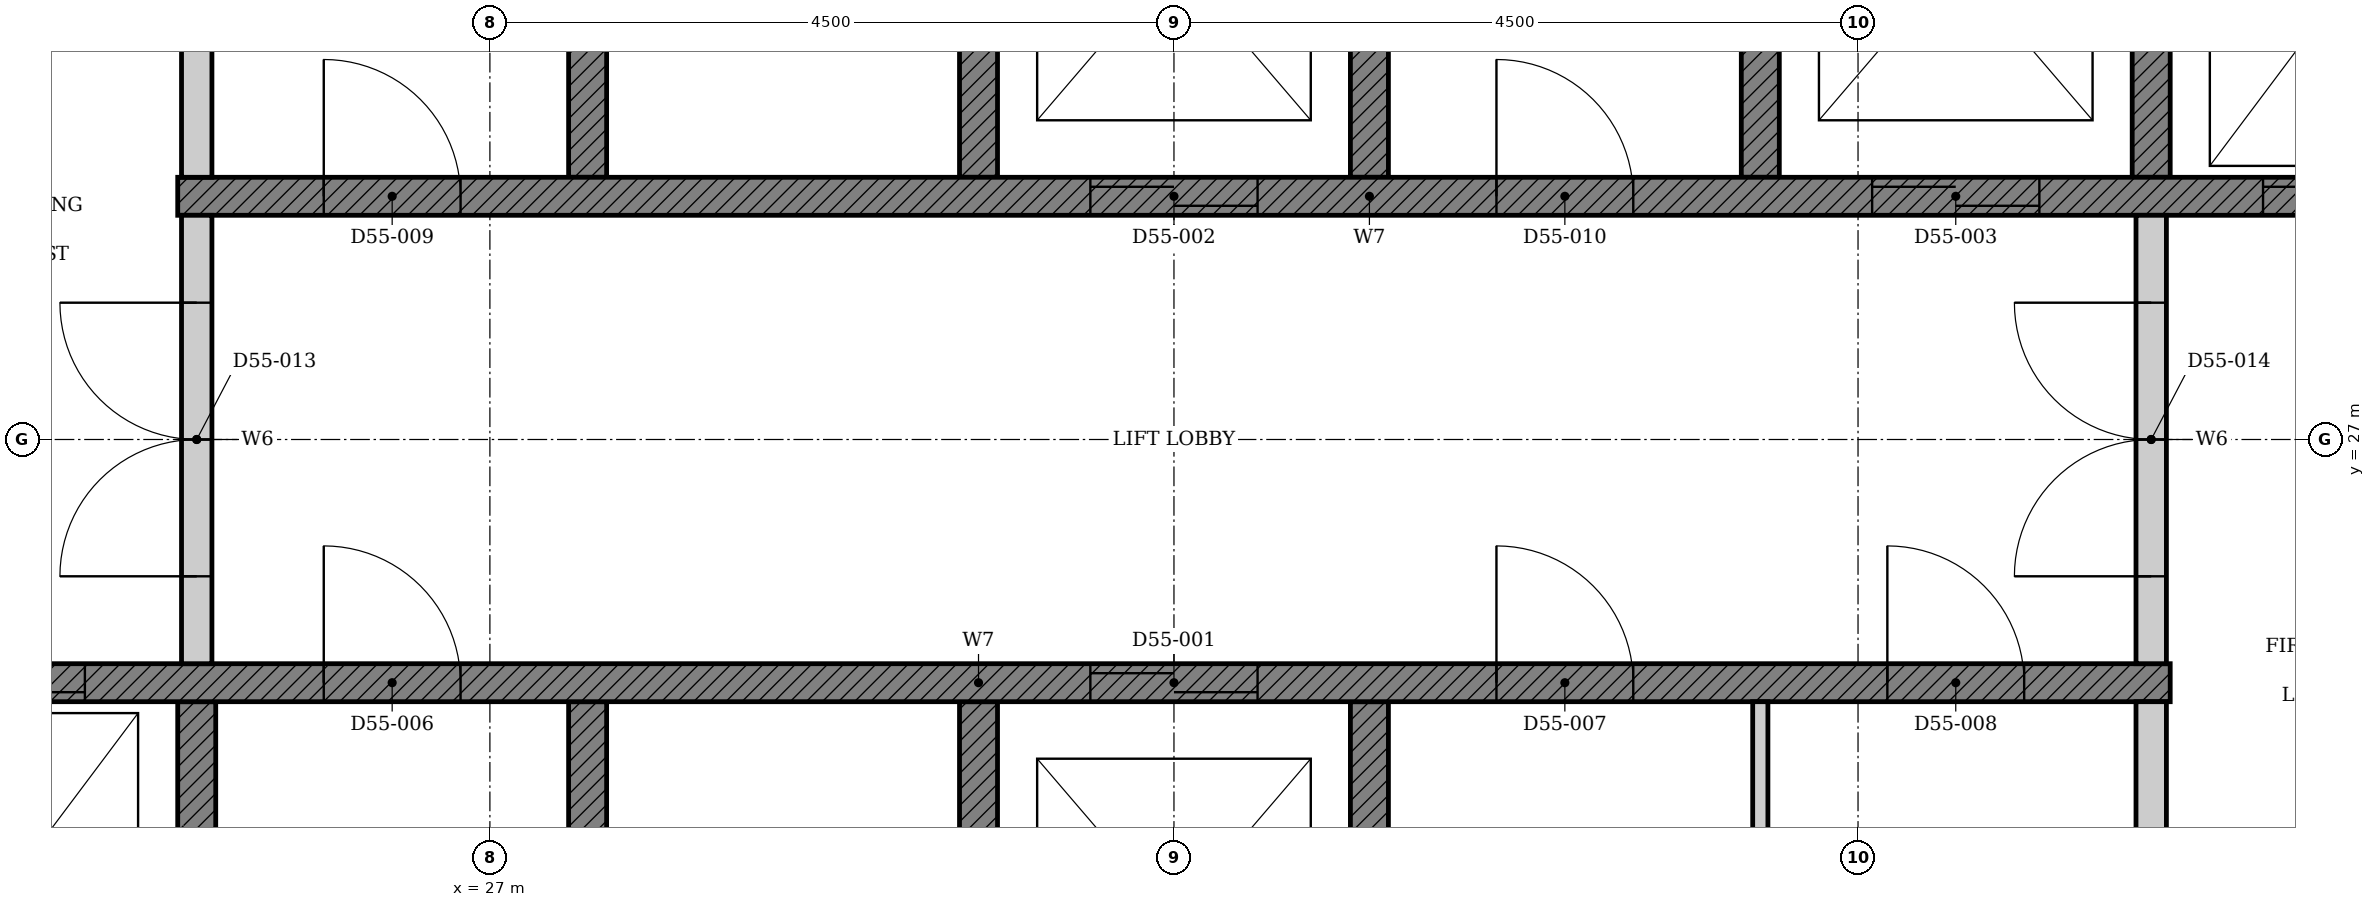
"""IFC4 building model, lengths in metres.
Left out: names, types, materials, properties, quantities, classifications, styles, units other than length and angle.
Written with IfcOpenShell. Run it as: python <this file> out.ifc"""

import sys

from ifc_helpers import new_model, si_unit, direction, frame, frame_2d, origin, place, context, subcontext, project, spatial, polyline, rectangle, outline, extrude, element, fill, save


model = new_model("IFC4")
c1 = context("Model", 3, precision=1e-05, world=origin(), true_north=direction((0.0, 1.0)))
c2 = subcontext(c1, "Body", "Model", "MODEL_VIEW")
j1 = project(units=[si_unit("LENGTHUNIT", "METRE"), si_unit("PLANEANGLEUNIT", "RADIAN")], contexts=[c1])
p1 = place(None, origin())
s1 = spatial("IfcSite", under=j1, at=p1, CompositionType="ELEMENT")
p2 = place(p1, origin())
s2 = spatial("IfcBuilding", under=s1, at=p2, CompositionType="ELEMENT")
p3 = place(p2, frame((0.0, 0.0, 218.3)))
s3 = spatial("IfcBuildingStorey", under=s2, at=p3, CompositionType="ELEMENT", Elevation=218.3)
p4 = place(p3, origin())
e1 = element("IfcWall", 1, at=p4, inside=s3, PredefinedType="SHEAR", context=c2, shape_type="SweptSolid", body=[
    extrude(outline(polyline([(22.375, 22.35), (25.197, 22.35), (25.197, 25.275), (24.947, 25.275), (24.947, 22.65), (22.625, 22.65), (22.625, 25.275), (22.375, 25.275), (22.375, 22.35)])), origin(), (0.0, 0.0, 1.0), 3.4),
])
p5 = place(p3, origin())
e2 = element("IfcWall", 2, at=p5, inside=s3, PredefinedType="SHEAR", context=c2, shape_type="SweptSolid", body=[
    extrude(outline(polyline([(27.518, 22.35), (32.911, 22.35), (32.911, 25.275), (32.661, 25.275), (32.661, 22.65), (30.339, 22.65), (30.339, 25.275), (30.089, 25.275), (30.089, 22.65), (27.768, 22.65), (27.768, 25.275), (27.518, 25.275), (27.518, 22.35)])), origin(), (0.0, 0.0, 1.0), 3.4),
])
p6 = place(p3, origin())
e3 = element("IfcWall", 3, at=p6, inside=s3, PredefinedType="SHEAR", context=c2, shape_type="SweptSolid", body=[
    extrude(outline(polyline([(27.518, 28.725), (27.768, 28.725), (27.768, 31.35), (30.089, 31.35), (30.089, 28.725), (30.339, 28.725), (30.339, 31.35), (32.661, 31.35), (32.661, 28.725), (32.911, 28.725), (32.911, 31.65), (27.518, 31.65), (27.518, 28.725)])), origin(), (0.0, 0.0, 1.0), 3.4),
])
p7 = place(p3, origin())
e4 = element("IfcWall", 4, at=p7, inside=s3, PredefinedType="SHEAR", context=c2, shape_type="SweptSolid", body=[
    extrude(outline(polyline([(35.232, 28.725), (35.482, 28.725), (35.482, 31.35), (37.803, 31.35), (37.803, 28.725), (38.053, 28.725), (38.053, 31.35), (40.375, 31.35), (40.375, 28.725), (40.625, 28.725), (40.625, 31.65), (35.232, 31.65), (35.232, 28.725)])), origin(), (0.0, 0.0, 1.0), 3.4),
])
p8 = place(p3, frame((22.375, 25.4, 0.0), z_axis=(0.0, 0.0, 1.0), x_axis=(1.0, 0.0, 0.0)))
e5 = element("IfcWall", 5, at=p8, inside=s3, PredefinedType="SHEAR", context=c2, shape_type="SweptSolid", body=[
    extrude(rectangle(XDim=15.678, YDim=0.25, at=frame_2d((7.839, 0.0))), origin(), (0.0, 0.0, 1.0), 3.4),
])
p9 = place(p8, frame((8.575, 0.0, 0.0)))
e6 = element("IfcOpeningElement", 6, at=p9, cuts=e5, PredefinedType="OPENING", context=c2, shape_type="SweptSolid", body=[
    extrude(rectangle(XDim=1.1, YDim=2.1, at=frame_2d((0.55, 1.05))), frame((0.0, 0.135, 0.0), z_axis=(0.0, -1.0, 0.0), x_axis=(1.0, 0.0, 0.0)), (0.0, 0.0, 1.0), 0.27),
])
p10 = place(p8, frame((0.861, 0.0, 0.0)))
e7 = element("IfcOpeningElement", 7, at=p10, cuts=e5, PredefinedType="OPENING", context=c2, shape_type="SweptSolid", body=[
    extrude(rectangle(XDim=1.1, YDim=2.1, at=frame_2d((0.55, 1.05))), frame((0.0, 0.135, 0.0), z_axis=(0.0, -1.0, 0.0), x_axis=(1.0, 0.0, 0.0)), (0.0, 0.0, 1.0), 0.27),
])
p11 = place(p8, frame((3.532, 0.0, 0.0)))
e8 = element("IfcOpeningElement", 8, at=p11, cuts=e5, PredefinedType="OPENING", context=c2, shape_type="SweptSolid", body=[
    extrude(rectangle(XDim=0.9, YDim=2.1, at=frame_2d((0.45, 1.05))), frame((0.0, 0.135, 0.0), z_axis=(0.0, -1.0, 0.0), x_axis=(1.0, 0.0, 0.0)), (0.0, 0.0, 1.0), 0.27),
])
p12 = place(p8, frame((11.246, 0.0, 0.0)))
e9 = element("IfcOpeningElement", 9, at=p12, cuts=e5, PredefinedType="OPENING", context=c2, shape_type="SweptSolid", body=[
    extrude(rectangle(XDim=0.9, YDim=2.1, at=frame_2d((0.45, 1.05))), frame((0.0, 0.135, 0.0), z_axis=(0.0, -1.0, 0.0), x_axis=(1.0, 0.0, 0.0)), (0.0, 0.0, 1.0), 0.27),
])
p13 = place(p8, frame((13.818, 0.0, 0.0)))
e10 = element("IfcOpeningElement", 10, at=p13, cuts=e5, PredefinedType="OPENING", context=c2, shape_type="SweptSolid", body=[
    extrude(rectangle(XDim=0.9, YDim=2.1, at=frame_2d((0.45, 1.05))), frame((0.0, 0.135, 0.0), z_axis=(0.0, -1.0, 0.0), x_axis=(1.0, 0.0, 0.0)), (0.0, 0.0, 1.0), 0.27),
])
p14 = place(p3, frame((24.947, 28.6, 0.0), z_axis=(0.0, 0.0, 1.0), x_axis=(1.0, 0.0, 0.0)))
e11 = element("IfcWall", 11, at=p14, inside=s3, PredefinedType="SHEAR", context=c2, shape_type="SweptSolid", body=[
    extrude(rectangle(XDim=15.678, YDim=0.25, at=frame_2d((7.839, 0.0))), origin(), (0.0, 0.0, 1.0), 3.4),
])
p15 = place(p14, frame((6.004, 0.0, 0.0)))
e12 = element("IfcOpeningElement", 12, at=p15, cuts=e11, PredefinedType="OPENING", context=c2, shape_type="SweptSolid", body=[
    extrude(rectangle(XDim=1.1, YDim=2.1, at=frame_2d((0.55, 1.05))), frame((0.0, 0.135, 0.0), z_axis=(0.0, -1.0, 0.0), x_axis=(1.0, 0.0, 0.0)), (0.0, 0.0, 1.0), 0.27),
])
p16 = place(p14, frame((11.146, 0.0, 0.0)))
e13 = element("IfcOpeningElement", 13, at=p16, cuts=e11, PredefinedType="OPENING", context=c2, shape_type="SweptSolid", body=[
    extrude(rectangle(XDim=1.1, YDim=2.1, at=frame_2d((0.55, 1.05))), frame((0.0, 0.135, 0.0), z_axis=(0.0, -1.0, 0.0), x_axis=(1.0, 0.0, 0.0)), (0.0, 0.0, 1.0), 0.27),
])
p17 = place(p14, frame((13.718, 0.0, 0.0)))
e14 = element("IfcOpeningElement", 14, at=p17, cuts=e11, PredefinedType="OPENING", context=c2, shape_type="SweptSolid", body=[
    extrude(rectangle(XDim=1.1, YDim=2.1, at=frame_2d((0.55, 1.05))), frame((0.0, 0.135, 0.0), z_axis=(0.0, -1.0, 0.0), x_axis=(1.0, 0.0, 0.0)), (0.0, 0.0, 1.0), 0.27),
])
p18 = place(p14, frame((0.961, 0.0, 0.0)))
e15 = element("IfcOpeningElement", 15, at=p18, cuts=e11, PredefinedType="OPENING", context=c2, shape_type="SweptSolid", body=[
    extrude(rectangle(XDim=0.9, YDim=2.1, at=frame_2d((0.45, 1.05))), frame((0.0, 0.135, 0.0), z_axis=(0.0, -1.0, 0.0), x_axis=(1.0, 0.0, 0.0)), (0.0, 0.0, 1.0), 0.27),
])
p19 = place(p14, frame((8.675, 0.0, 0.0)))
e16 = element("IfcOpeningElement", 16, at=p19, cuts=e11, PredefinedType="OPENING", context=c2, shape_type="SweptSolid", body=[
    extrude(rectangle(XDim=0.9, YDim=2.1, at=frame_2d((0.45, 1.05))), frame((0.0, 0.135, 0.0), z_axis=(0.0, -1.0, 0.0), x_axis=(1.0, 0.0, 0.0)), (0.0, 0.0, 1.0), 0.27),
])
p20 = place(p3, frame((37.928, 22.65, 0.0), z_axis=(0.0, 0.0, 1.0), x_axis=(0.0, 1.0, 0.0)))
e17 = element("IfcWall", 17, at=p20, inside=s3, PredefinedType="PARTITIONING", context=c2, shape_type="SweptSolid", body=[
    extrude(rectangle(XDim=2.625, YDim=0.2, at=frame_2d((1.312, 0.0))), origin(), (0.0, 0.0, 1.0), 3.4),
])
p21 = place(p3, frame((35.357, 22.65, 0.0), z_axis=(0.0, 0.0, 1.0), x_axis=(0.0, 1.0, 0.0)))
e18 = element("IfcWall", 18, at=p21, inside=s3, PredefinedType="PARTITIONING", context=c2, shape_type="SweptSolid", body=[
    extrude(rectangle(XDim=2.625, YDim=0.1, at=frame_2d((1.312, 0.0))), origin(), (0.0, 0.0, 1.0), 3.4),
])
p22 = place(p3, frame((25.072, 28.725, 0.0), z_axis=(0.0, 0.0, 1.0), x_axis=(0.0, 1.0, 0.0)))
e19 = element("IfcWall", 19, at=p22, inside=s3, PredefinedType="PARTITIONING", context=c2, shape_type="SweptSolid", body=[
    extrude(rectangle(XDim=2.625, YDim=0.2, at=frame_2d((1.312, 0.0))), origin(), (0.0, 0.0, 1.0), 3.4),
])
p23 = place(p3, frame((25.072, 25.525, 0.0), z_axis=(0.0, 0.0, 1.0), x_axis=(0.0, 1.0, 0.0)))
e20 = element("IfcWall", 20, at=p23, inside=s3, PredefinedType="PARTITIONING", context=c2, shape_type="SweptSolid", body=[
    extrude(rectangle(XDim=2.95, YDim=0.2, at=frame_2d((1.475, 0.0))), origin(), (0.0, 0.0, 1.0), 3.4),
])
p24 = place(p23, frame((0.575, 0.0, 0.0)))
e21 = element("IfcOpeningElement", 21, at=p24, cuts=e20, PredefinedType="OPENING", context=c2, shape_type="SweptSolid", body=[
    extrude(rectangle(XDim=1.8, YDim=2.1, at=frame_2d((0.9, 1.05))), frame((0.0, 0.11, 0.0), z_axis=(0.0, -1.0, 0.0), x_axis=(1.0, 0.0, 0.0)), (0.0, 0.0, 1.0), 0.22),
])
p25 = place(p3, frame((37.928, 25.525, 0.0), z_axis=(0.0, 0.0, 1.0), x_axis=(0.0, 1.0, 0.0)))
e22 = element("IfcWall", 22, at=p25, inside=s3, PredefinedType="PARTITIONING", context=c2, shape_type="SweptSolid", body=[
    extrude(rectangle(XDim=2.95, YDim=0.2, at=frame_2d((1.475, 0.0))), origin(), (0.0, 0.0, 1.0), 3.4),
])
p26 = place(p25, frame((0.575, 0.0, 0.0)))
e23 = element("IfcOpeningElement", 23, at=p26, cuts=e22, PredefinedType="OPENING", context=c2, shape_type="SweptSolid", body=[
    extrude(rectangle(XDim=1.8, YDim=2.1, at=frame_2d((0.9, 1.05))), frame((0.0, 0.11, 0.0), z_axis=(0.0, -1.0, 0.0), x_axis=(1.0, 0.0, 0.0)), (0.0, 0.0, 1.0), 0.22),
])
p27 = place(p9, origin())
e24 = element("IfcDoor", 24, at=p27, inside=s3, OperationType="DOUBLE_DOOR_SLIDING", PredefinedType="DOOR", context=c2, shape_type="SweptSolid", body=[
    extrude(rectangle(XDim=1.1, YDim=2.1, at=frame_2d((0.55, 1.05))), frame((0.0, 0.025, 0.0), z_axis=(0.0, -1.0, 0.0), x_axis=(1.0, 0.0, 0.0)), (0.0, 0.0, 1.0), 0.05),
])
fill(e6, e24)
p28 = place(p15, origin())
e25 = element("IfcDoor", 25, at=p28, inside=s3, OperationType="DOUBLE_DOOR_SLIDING", PredefinedType="DOOR", context=c2, shape_type="SweptSolid", body=[
    extrude(rectangle(XDim=1.1, YDim=2.1, at=frame_2d((0.55, 1.05))), frame((0.0, 0.025, 0.0), z_axis=(0.0, -1.0, 0.0), x_axis=(1.0, 0.0, 0.0)), (0.0, 0.0, 1.0), 0.05),
])
fill(e12, e25)
p29 = place(p16, origin())
e26 = element("IfcDoor", 26, at=p29, inside=s3, OperationType="DOUBLE_DOOR_SLIDING", PredefinedType="DOOR", context=c2, shape_type="SweptSolid", body=[
    extrude(rectangle(XDim=1.1, YDim=2.1, at=frame_2d((0.55, 1.05))), frame((0.0, 0.025, 0.0), z_axis=(0.0, -1.0, 0.0), x_axis=(1.0, 0.0, 0.0)), (0.0, 0.0, 1.0), 0.05),
])
fill(e13, e26)
p30 = place(p10, origin())
e27 = element("IfcDoor", 27, at=p30, inside=s3, OperationType="DOUBLE_DOOR_SLIDING", PredefinedType="DOOR", context=c2, shape_type="SweptSolid", body=[
    extrude(rectangle(XDim=1.1, YDim=2.1, at=frame_2d((0.55, 1.05))), frame((0.0, 0.025, 0.0), z_axis=(0.0, -1.0, 0.0), x_axis=(1.0, 0.0, 0.0)), (0.0, 0.0, 1.0), 0.05),
])
fill(e7, e27)
p31 = place(p17, origin())
e28 = element("IfcDoor", 28, at=p31, inside=s3, OperationType="DOUBLE_DOOR_SLIDING", PredefinedType="DOOR", context=c2, shape_type="SweptSolid", body=[
    extrude(rectangle(XDim=1.1, YDim=2.1, at=frame_2d((0.55, 1.05))), frame((0.0, 0.025, 0.0), z_axis=(0.0, -1.0, 0.0), x_axis=(1.0, 0.0, 0.0)), (0.0, 0.0, 1.0), 0.05),
])
fill(e14, e28)
p32 = place(p11, origin())
e29 = element("IfcDoor", 29, at=p32, inside=s3, OperationType="SINGLE_SWING_LEFT", PredefinedType="DOOR", context=c2, shape_type="SweptSolid", body=[
    extrude(rectangle(XDim=0.9, YDim=2.1, at=frame_2d((0.45, 1.05))), frame((0.0, 0.025, 0.0), z_axis=(0.0, -1.0, 0.0), x_axis=(1.0, 0.0, 0.0)), (0.0, 0.0, 1.0), 0.05),
])
fill(e8, e29)
p33 = place(p12, origin())
e30 = element("IfcDoor", 30, at=p33, inside=s3, OperationType="SINGLE_SWING_LEFT", PredefinedType="DOOR", context=c2, shape_type="SweptSolid", body=[
    extrude(rectangle(XDim=0.9, YDim=2.1, at=frame_2d((0.45, 1.05))), frame((0.0, 0.025, 0.0), z_axis=(0.0, -1.0, 0.0), x_axis=(1.0, 0.0, 0.0)), (0.0, 0.0, 1.0), 0.05),
])
fill(e9, e30)
p34 = place(p13, origin())
e31 = element("IfcDoor", 31, at=p34, inside=s3, OperationType="SINGLE_SWING_LEFT", PredefinedType="DOOR", context=c2, shape_type="SweptSolid", body=[
    extrude(rectangle(XDim=0.9, YDim=2.1, at=frame_2d((0.45, 1.05))), frame((0.0, 0.025, 0.0), z_axis=(0.0, -1.0, 0.0), x_axis=(1.0, 0.0, 0.0)), (0.0, 0.0, 1.0), 0.05),
])
fill(e10, e31)
p35 = place(p18, origin())
e32 = element("IfcDoor", 32, at=p35, inside=s3, OperationType="SINGLE_SWING_LEFT", PredefinedType="DOOR", context=c2, shape_type="SweptSolid", body=[
    extrude(rectangle(XDim=0.9, YDim=2.1, at=frame_2d((0.45, 1.05))), frame((0.0, 0.025, 0.0), z_axis=(0.0, -1.0, 0.0), x_axis=(1.0, 0.0, 0.0)), (0.0, 0.0, 1.0), 0.05),
])
fill(e15, e32)
p36 = place(p19, origin())
e33 = element("IfcDoor", 33, at=p36, inside=s3, OperationType="SINGLE_SWING_LEFT", PredefinedType="DOOR", context=c2, shape_type="SweptSolid", body=[
    extrude(rectangle(XDim=0.9, YDim=2.1, at=frame_2d((0.45, 1.05))), frame((0.0, 0.025, 0.0), z_axis=(0.0, -1.0, 0.0), x_axis=(1.0, 0.0, 0.0)), (0.0, 0.0, 1.0), 0.05),
])
fill(e16, e33)
p37 = place(p24, origin())
e34 = element("IfcDoor", 34, at=p37, inside=s3, OperationType="DOUBLE_DOOR_SINGLE_SWING", PredefinedType="DOOR", context=c2, shape_type="SweptSolid", body=[
    extrude(rectangle(XDim=1.8, YDim=2.1, at=frame_2d((0.9, 1.05))), frame((0.0, 0.025, 0.0), z_axis=(0.0, -1.0, 0.0), x_axis=(1.0, 0.0, 0.0)), (0.0, 0.0, 1.0), 0.05),
])
fill(e21, e34)
p38 = place(p26, origin())
e35 = element("IfcDoor", 35, at=p38, inside=s3, OperationType="DOUBLE_DOOR_SINGLE_SWING", PredefinedType="DOOR", context=c2, shape_type="SweptSolid", body=[
    extrude(rectangle(XDim=1.8, YDim=2.1, at=frame_2d((0.9, 1.05))), frame((0.0, 0.025, 0.0), z_axis=(0.0, -1.0, 0.0), x_axis=(1.0, 0.0, 0.0)), (0.0, 0.0, 1.0), 0.05),
])
fill(e23, e35)
save(model, sys.argv[1])
